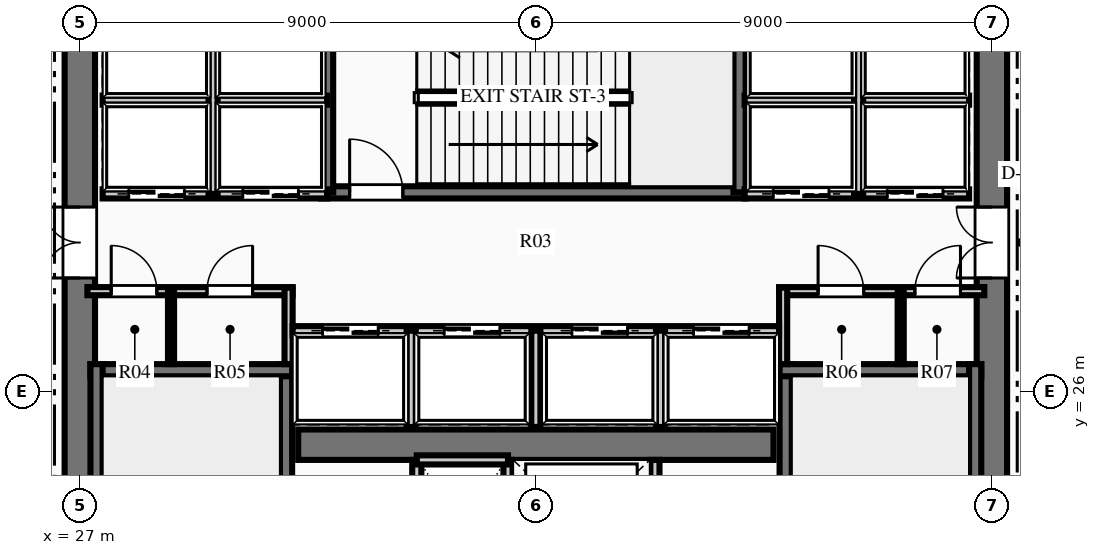
"""IFC4 building model, lengths in metres.
Left out: names, types, materials, properties, quantities, classifications, styles, units other than length and angle.
Written with IfcOpenShell. Run it as: python <this file> out.ifc"""

import sys

from ifc_helpers import new_model, si_unit, direction, frame, frame_2d, origin, place, context, subcontext, project, spatial, rectangle, extrude, element, fill, save


model = new_model("IFC4")
c1 = context("Model", 3, precision=1e-05, world=origin(), true_north=direction((0.0, 1.0)))
c2 = subcontext(c1, "Body", "Model", "MODEL_VIEW")
j1 = project(units=[si_unit("LENGTHUNIT", "METRE"), si_unit("PLANEANGLEUNIT", "RADIAN")], contexts=[c1])
p1 = place(None, origin())
s1 = spatial("IfcSite", under=j1, at=p1, CompositionType="ELEMENT")
p2 = place(p1, origin())
s2 = spatial("IfcBuilding", under=s1, at=p2, CompositionType="ELEMENT")
p3 = place(p2, frame((0.0, 0.0, 6.0)))
s3 = spatial("IfcBuildingStorey", under=s2, at=p3, CompositionType="ELEMENT", Elevation=6.0)
p4 = place(p3, frame((27.0, 18.3, 0.0), z_axis=(0.0, 0.0, 1.0), x_axis=(0.0, 1.0, 0.0)))
e1 = element("IfcWall", 1, at=p4, inside=s3, PredefinedType="SHEAR", context=c2, shape_type="SweptSolid", body=[
    extrude(rectangle(XDim=15.4, YDim=0.6, at=frame_2d((7.7, 0.0))), origin(), (0.0, 0.0, 1.0), 5.4),
])
p5 = place(p4, frame((9.94, 0.0, 0.0)))
e2 = element("IfcOpeningElement", 2, at=p5, cuts=e1, PredefinedType="OPENING", context=c2, shape_type="SweptSolid", body=[
    extrude(rectangle(XDim=1.4, YDim=2.2, at=frame_2d((0.7, 1.1))), frame((0.0, 0.31, 0.0), z_axis=(0.0, -1.0, 0.0), x_axis=(1.0, 0.0, 0.0)), (0.0, 0.0, 1.0), 0.62),
])
p6 = place(p3, frame((45.0, 18.3, 0.0), z_axis=(0.0, 0.0, 1.0), x_axis=(0.0, 1.0, 0.0)))
e3 = element("IfcWall", 3, at=p6, inside=s3, PredefinedType="SHEAR", context=c2, shape_type="SweptSolid", body=[
    extrude(rectangle(XDim=15.4, YDim=0.6, at=frame_2d((7.7, 0.0))), origin(), (0.0, 0.0, 1.0), 5.4),
])
p7 = place(p6, frame((9.94, 0.0, 0.0)))
e4 = element("IfcOpeningElement", 4, at=p7, cuts=e3, PredefinedType="OPENING", context=c2, shape_type="SweptSolid", body=[
    extrude(rectangle(XDim=1.4, YDim=2.2, at=frame_2d((0.7, 1.1))), frame((0.0, 0.31, 0.0), z_axis=(0.0, -1.0, 0.0), x_axis=(1.0, 0.0, 0.0)), (0.0, 0.0, 1.0), 0.62),
])
p8 = place(p3, frame((31.31, 24.95, 0.0), z_axis=(0.0, 0.0, 1.0), x_axis=(1.0, 0.0, 0.0)))
e5 = element("IfcWall", 5, at=p8, inside=s3, PredefinedType="SHEAR", context=c2, shape_type="SweptSolid", body=[
    extrude(rectangle(XDim=9.38, YDim=0.6, at=frame_2d((4.69, 0.0))), origin(), (0.0, 0.0, 1.0), 5.4),
])
p9 = place(p3, frame((31.07, 18.28, 0.0), z_axis=(0.0, 0.0, 1.0), x_axis=(0.0, 1.0, 0.0)))
e6 = element("IfcWall", 6, at=p9, inside=s3, PredefinedType="SHEAR", context=c2, shape_type="SweptSolid", body=[
    extrude(rectangle(XDim=8.26, YDim=0.24, at=frame_2d((4.13, 0.0))), origin(), (0.0, 0.0, 1.0), 5.4),
])
p10 = place(p9, frame((0.365, 0.0, 0.0)))
e7 = element("IfcOpeningElement", 7, at=p10, cuts=e6, PredefinedType="OPENING", context=c2, shape_type="SweptSolid", body=[
    extrude(rectangle(XDim=1.05, YDim=2.15, at=frame_2d((0.525, 1.075))), frame((0.0, 0.13, 0.0), z_axis=(0.0, -1.0, 0.0), x_axis=(1.0, 0.0, 0.0)), (0.0, 0.0, 1.0), 0.26),
])
p11 = place(p3, frame((27.21, 26.42, 0.0), z_axis=(0.0, 0.0, 1.0), x_axis=(1.0, 0.0, 0.0)))
e8 = element("IfcWall", 8, at=p11, inside=s3, PredefinedType="SHEAR", context=c2, shape_type="SweptSolid", body=[
    extrude(rectangle(XDim=3.98, YDim=0.24, at=frame_2d((1.99, 0.0))), origin(), (0.0, 0.0, 1.0), 5.4),
])
p12 = place(p3, frame((27.33, 18.28, 0.0), z_axis=(0.0, 0.0, 1.0), x_axis=(0.0, 1.0, 0.0)))
e9 = element("IfcWall", 9, at=p12, inside=s3, PredefinedType="SHEAR", context=c2, shape_type="SweptSolid", body=[
    extrude(rectangle(XDim=8.26, YDim=0.24, at=frame_2d((4.13, 0.0))), origin(), (0.0, 0.0, 1.0), 5.4),
])
p13 = place(p3, frame((40.93, 18.28, 0.0), z_axis=(0.0, 0.0, 1.0), x_axis=(0.0, 1.0, 0.0)))
e10 = element("IfcWall", 10, at=p13, inside=s3, PredefinedType="SHEAR", context=c2, shape_type="SweptSolid", body=[
    extrude(rectangle(XDim=8.26, YDim=0.24, at=frame_2d((4.13, 0.0))), origin(), (0.0, 0.0, 1.0), 5.4),
])
p14 = place(p13, frame((0.365, 0.0, 0.0)))
e11 = element("IfcOpeningElement", 11, at=p14, cuts=e10, PredefinedType="OPENING", context=c2, shape_type="SweptSolid", body=[
    extrude(rectangle(XDim=1.05, YDim=2.15, at=frame_2d((0.525, 1.075))), frame((0.0, 0.13, 0.0), z_axis=(0.0, -1.0, 0.0), x_axis=(1.0, 0.0, 0.0)), (0.0, 0.0, 1.0), 0.26),
])
p15 = place(p3, frame((40.81, 26.42, 0.0), z_axis=(0.0, 0.0, 1.0), x_axis=(1.0, 0.0, 0.0)))
e12 = element("IfcWall", 12, at=p15, inside=s3, PredefinedType="SHEAR", context=c2, shape_type="SweptSolid", body=[
    extrude(rectangle(XDim=3.98, YDim=0.24, at=frame_2d((1.99, 0.0))), origin(), (0.0, 0.0, 1.0), 5.4),
])
p16 = place(p3, frame((44.67, 18.28, 0.0), z_axis=(0.0, 0.0, 1.0), x_axis=(0.0, 1.0, 0.0)))
e13 = element("IfcWall", 13, at=p16, inside=s3, PredefinedType="SHEAR", context=c2, shape_type="SweptSolid", body=[
    extrude(rectangle(XDim=8.26, YDim=0.24, at=frame_2d((4.13, 0.0))), origin(), (0.0, 0.0, 1.0), 5.4),
])
p17 = place(p3, frame((31.76, 29.93, 0.0), z_axis=(0.0, 0.0, 1.0), x_axis=(1.0, 0.0, 0.0)))
e14 = element("IfcWall", 14, at=p17, inside=s3, PredefinedType="SHEAR", context=c2, shape_type="SweptSolid", body=[
    extrude(rectangle(XDim=8.38, YDim=0.24, at=frame_2d((4.19, 0.0))), origin(), (0.0, 0.0, 1.0), 5.4),
])
p18 = place(p17, frame((0.565, 0.0, 0.0)))
e15 = element("IfcOpeningElement", 15, at=p18, cuts=e14, PredefinedType="OPENING", context=c2, shape_type="SweptSolid", body=[
    extrude(rectangle(XDim=1.05, YDim=2.15, at=frame_2d((0.525, 1.075))), frame((0.0, 0.13, 0.0), z_axis=(0.0, -1.0, 0.0), x_axis=(1.0, 0.0, 0.0)), (0.0, 0.0, 1.0), 0.26),
])
p19 = place(p3, frame((31.88, 29.93, 0.0), z_axis=(0.0, 0.0, 1.0), x_axis=(0.0, 1.0, 0.0)))
e16 = element("IfcWall", 16, at=p19, inside=s3, PredefinedType="SHEAR", context=c2, shape_type="SweptSolid", body=[
    extrude(rectangle(XDim=3.79, YDim=0.24, at=frame_2d((1.895, 0.0))), origin(), (0.0, 0.0, 1.0), 5.4),
])
p20 = place(p3, frame((40.02, 29.93, 0.0), z_axis=(0.0, 0.0, 1.0), x_axis=(0.0, 1.0, 0.0)))
e17 = element("IfcWall", 17, at=p20, inside=s3, PredefinedType="SHEAR", context=c2, shape_type="SweptSolid", body=[
    extrude(rectangle(XDim=3.85, YDim=0.24, at=frame_2d((1.925, 0.0))), origin(), (0.0, 0.0, 1.0), 5.4),
])
for number, where, z_axis, x_axis in (
    (18, (33.65, 22.05, 0.0), (0.0, 0.0, 1.0), (0.0, 1.0, 0.0)),
    (19, (35.45, 22.05, 0.0), (0.0, 0.0, 1.0), (0.0, 1.0, 0.0)),
):
    element("IfcWall", number, at=place(p3, frame(where, z_axis=z_axis, x_axis=x_axis)), inside=s3, PredefinedType="PARTITIONING", context=c2, shape_type="SweptSolid", body=[
        extrude(rectangle(XDim=2.6, YDim=0.18, at=frame_2d((1.3, 0.0))), origin(), (0.0, 0.0, 1.0), 5.07),
    ])
p21 = place(p3, frame((33.65, 24.65, 0.0), z_axis=(0.0, 0.0, 1.0), x_axis=(1.0, 0.0, 0.0)))
e20 = element("IfcWall", 20, at=p21, inside=s3, PredefinedType="PARTITIONING", context=c2, shape_type="SweptSolid", body=[
    extrude(rectangle(XDim=1.8, YDim=0.18, at=frame_2d((0.9, 0.0))), origin(), (0.0, 0.0, 1.0), 5.07),
])
p22 = place(p3, frame((38.35, 22.05, 0.0), z_axis=(0.0, 0.0, 1.0), x_axis=(0.0, 1.0, 0.0)))
e21 = element("IfcWall", 21, at=p22, inside=s3, PredefinedType="PARTITIONING", context=c2, shape_type="SweptSolid", body=[
    extrude(rectangle(XDim=2.6, YDim=0.18, at=frame_2d((1.3, 0.0))), origin(), (0.0, 0.0, 1.0), 5.07),
])
p23 = place(p3, frame((27.15, 27.98, 0.0), z_axis=(0.0, 0.0, 1.0), x_axis=(1.0, 0.0, 0.0)))
e22 = element("IfcWall", 22, at=p23, inside=s3, PredefinedType="PARTITIONING", context=c2, shape_type="SweptSolid", body=[
    extrude(rectangle(XDim=4.05, YDim=0.16, at=frame_2d((2.025, 0.0))), origin(), (0.0, 0.0, 1.0), 5.07),
])
p24 = place(p23, frame((0.47, 0.0, 0.0)))
e23 = element("IfcOpeningElement", 23, at=p24, cuts=e22, PredefinedType="OPENING", context=c2, shape_type="SweptSolid", body=[
    extrude(rectangle(XDim=0.9, YDim=2.15, at=frame_2d((0.45, 1.075))), frame((0.0, 0.09, 0.0), z_axis=(0.0, -1.0, 0.0), x_axis=(1.0, 0.0, 0.0)), (0.0, 0.0, 1.0), 0.18),
])
p25 = place(p23, frame((2.36, 0.0, 0.0)))
e24 = element("IfcOpeningElement", 24, at=p25, cuts=e22, PredefinedType="OPENING", context=c2, shape_type="SweptSolid", body=[
    extrude(rectangle(XDim=0.9, YDim=2.15, at=frame_2d((0.45, 1.075))), frame((0.0, 0.09, 0.0), z_axis=(0.0, -1.0, 0.0), x_axis=(1.0, 0.0, 0.0)), (0.0, 0.0, 1.0), 0.18),
])
p26 = place(p3, frame((31.12, 26.54, 0.0), z_axis=(0.0, 0.0, 1.0), x_axis=(0.0, 1.0, 0.0)))
e25 = element("IfcWall", 25, at=p26, inside=s3, PredefinedType="PARTITIONING", context=c2, shape_type="SweptSolid", body=[
    extrude(rectangle(XDim=1.51, YDim=0.16, at=frame_2d((0.755, 0.0))), origin(), (0.0, 0.0, 1.0), 5.07),
])
p27 = place(p3, frame((40.8, 27.98, 0.0), z_axis=(0.0, 0.0, 1.0), x_axis=(1.0, 0.0, 0.0)))
e26 = element("IfcWall", 26, at=p27, inside=s3, PredefinedType="PARTITIONING", context=c2, shape_type="SweptSolid", body=[
    extrude(rectangle(XDim=4.05, YDim=0.16, at=frame_2d((2.025, 0.0))), origin(), (0.0, 0.0, 1.0), 5.07),
])
p28 = place(p27, frame((0.77, 0.0, 0.0)))
e27 = element("IfcOpeningElement", 27, at=p28, cuts=e26, PredefinedType="OPENING", context=c2, shape_type="SweptSolid", body=[
    extrude(rectangle(XDim=0.9, YDim=2.15, at=frame_2d((0.45, 1.075))), frame((0.0, 0.09, 0.0), z_axis=(0.0, -1.0, 0.0), x_axis=(1.0, 0.0, 0.0)), (0.0, 0.0, 1.0), 0.18),
])
p29 = place(p27, frame((2.68, 0.0, 0.0)))
e28 = element("IfcOpeningElement", 28, at=p29, cuts=e26, PredefinedType="OPENING", context=c2, shape_type="SweptSolid", body=[
    extrude(rectangle(XDim=0.9, YDim=2.15, at=frame_2d((0.45, 1.075))), frame((0.0, 0.09, 0.0), z_axis=(0.0, -1.0, 0.0), x_axis=(1.0, 0.0, 0.0)), (0.0, 0.0, 1.0), 0.18),
])
p30 = place(p3, frame((40.88, 26.54, 0.0), z_axis=(0.0, 0.0, 1.0), x_axis=(0.0, 1.0, 0.0)))
e29 = element("IfcWall", 29, at=p30, inside=s3, PredefinedType="PARTITIONING", context=c2, shape_type="SweptSolid", body=[
    extrude(rectangle(XDim=1.51, YDim=0.16, at=frame_2d((0.755, 0.0))), origin(), (0.0, 0.0, 1.0), 5.07),
])
for number, where, z_axis, x_axis in (
    (30, (28.8, 26.54, 0.0), (0.0, 0.0, 1.0), (0.0, 1.0, 0.0)),
    (31, (43.2, 26.54, 0.0), (0.0, 0.0, 1.0), (0.0, 1.0, 0.0)),
):
    element("IfcWall", number, at=place(p3, frame(where, z_axis=z_axis, x_axis=x_axis)), inside=s3, PredefinedType="PARTITIONING", context=c2, shape_type="SweptSolid", body=[
        extrude(rectangle(XDim=1.44, YDim=0.12, at=frame_2d((0.72, 0.0))), origin(), (0.0, 0.0, 1.0), 5.07),
    ])
p31 = place(p3, frame((27.45, 29.9, 0.0), z_axis=(0.0, 0.0, 1.0), x_axis=(1.0, 0.0, 0.0)))
e32 = element("IfcWall", 32, at=p31, inside=s3, PredefinedType="PARTITIONING", context=c2, shape_type="SweptSolid", body=[
    extrude(rectangle(XDim=4.43, YDim=0.18, at=frame_2d((2.215, 0.0))), origin(), (0.0, 0.0, 1.0), 5.07),
])
p32 = place(p31, frame((0.515, 0.0, 0.0)))
e33 = element("IfcOpeningElement", 33, at=p32, cuts=e32, PredefinedType="OPENING", context=c2, shape_type="SweptSolid", body=[
    extrude(rectangle(XDim=1.1, YDim=2.15, at=frame_2d((0.55, 1.075))), frame((0.0, 0.1, 0.0), z_axis=(0.0, -1.0, 0.0), x_axis=(1.0, 0.0, 0.0)), (0.0, 0.0, 1.0), 0.2),
])
p33 = place(p31, frame((2.765, 0.0, 0.0)))
e34 = element("IfcOpeningElement", 34, at=p33, cuts=e32, PredefinedType="OPENING", context=c2, shape_type="SweptSolid", body=[
    extrude(rectangle(XDim=1.1, YDim=2.15, at=frame_2d((0.55, 1.075))), frame((0.0, 0.1, 0.0), z_axis=(0.0, -1.0, 0.0), x_axis=(1.0, 0.0, 0.0)), (0.0, 0.0, 1.0), 0.2),
])
p34 = place(p3, frame((27.45, 31.75, 0.0), z_axis=(0.0, 0.0, 1.0), x_axis=(1.0, 0.0, 0.0)))
e35 = element("IfcWall", 35, at=p34, inside=s3, PredefinedType="PARTITIONING", context=c2, shape_type="SweptSolid", body=[
    extrude(rectangle(XDim=4.43, YDim=0.18, at=frame_2d((2.215, 0.0))), origin(), (0.0, 0.0, 1.0), 5.07),
])
p35 = place(p3, frame((29.63, 29.9, 0.0), z_axis=(0.0, 0.0, 1.0), x_axis=(0.0, 1.0, 0.0)))
e36 = element("IfcWall", 36, at=p35, inside=s3, PredefinedType="PARTITIONING", context=c2, shape_type="SweptSolid", body=[
    extrude(rectangle(XDim=3.75, YDim=0.18, at=frame_2d((1.875, 0.0))), origin(), (0.0, 0.0, 1.0), 5.07),
])
p36 = place(p3, frame((40.12, 29.9, 0.0), z_axis=(0.0, 0.0, 1.0), x_axis=(1.0, 0.0, 0.0)))
e37 = element("IfcWall", 37, at=p36, inside=s3, PredefinedType="PARTITIONING", context=c2, shape_type="SweptSolid", body=[
    extrude(rectangle(XDim=4.43, YDim=0.18, at=frame_2d((2.215, 0.0))), origin(), (0.0, 0.0, 1.0), 5.07),
])
p37 = place(p36, frame((0.565, 0.0, 0.0)))
e38 = element("IfcOpeningElement", 38, at=p37, cuts=e37, PredefinedType="OPENING", context=c2, shape_type="SweptSolid", body=[
    extrude(rectangle(XDim=1.1, YDim=2.15, at=frame_2d((0.55, 1.075))), frame((0.0, 0.1, 0.0), z_axis=(0.0, -1.0, 0.0), x_axis=(1.0, 0.0, 0.0)), (0.0, 0.0, 1.0), 0.2),
])
p38 = place(p36, frame((2.815, 0.0, 0.0)))
e39 = element("IfcOpeningElement", 39, at=p38, cuts=e37, PredefinedType="OPENING", context=c2, shape_type="SweptSolid", body=[
    extrude(rectangle(XDim=1.1, YDim=2.15, at=frame_2d((0.55, 1.075))), frame((0.0, 0.1, 0.0), z_axis=(0.0, -1.0, 0.0), x_axis=(1.0, 0.0, 0.0)), (0.0, 0.0, 1.0), 0.2),
])
p39 = place(p3, frame((40.12, 31.75, 0.0), z_axis=(0.0, 0.0, 1.0), x_axis=(1.0, 0.0, 0.0)))
e40 = element("IfcWall", 40, at=p39, inside=s3, PredefinedType="PARTITIONING", context=c2, shape_type="SweptSolid", body=[
    extrude(rectangle(XDim=4.43, YDim=0.18, at=frame_2d((2.215, 0.0))), origin(), (0.0, 0.0, 1.0), 5.07),
])
p40 = place(p3, frame((42.37, 29.9, 0.0), z_axis=(0.0, 0.0, 1.0), x_axis=(0.0, 1.0, 0.0)))
e41 = element("IfcWall", 41, at=p40, inside=s3, PredefinedType="PARTITIONING", context=c2, shape_type="SweptSolid", body=[
    extrude(rectangle(XDim=3.75, YDim=0.18, at=frame_2d((1.875, 0.0))), origin(), (0.0, 0.0, 1.0), 5.07),
])
p41 = place(p3, frame((31.2, 27.2, 0.0), z_axis=(0.0, 0.0, 1.0), x_axis=(1.0, 0.0, 0.0)))
e42 = element("IfcWall", 42, at=p41, inside=s3, PredefinedType="PARTITIONING", context=c2, shape_type="SweptSolid", body=[
    extrude(rectangle(XDim=9.6, YDim=0.18, at=frame_2d((4.8, 0.0))), origin(), (0.0, 0.0, 1.0), 5.07),
])
p42 = place(p41, frame((0.59, 0.0, 0.0)))
e43 = element("IfcOpeningElement", 43, at=p42, cuts=e42, PredefinedType="OPENING", context=c2, shape_type="SweptSolid", body=[
    extrude(rectangle(XDim=1.1, YDim=2.15, at=frame_2d((0.55, 1.075))), frame((0.0, 0.1, 0.0), z_axis=(0.0, -1.0, 0.0), x_axis=(1.0, 0.0, 0.0)), (0.0, 0.0, 1.0), 0.2),
])
p43 = place(p41, frame((2.99, 0.0, 0.0)))
e44 = element("IfcOpeningElement", 44, at=p43, cuts=e42, PredefinedType="OPENING", context=c2, shape_type="SweptSolid", body=[
    extrude(rectangle(XDim=1.1, YDim=2.15, at=frame_2d((0.55, 1.075))), frame((0.0, 0.1, 0.0), z_axis=(0.0, -1.0, 0.0), x_axis=(1.0, 0.0, 0.0)), (0.0, 0.0, 1.0), 0.2),
])
p44 = place(p41, frame((5.51, 0.0, 0.0)))
e45 = element("IfcOpeningElement", 45, at=p44, cuts=e42, PredefinedType="OPENING", context=c2, shape_type="SweptSolid", body=[
    extrude(rectangle(XDim=1.1, YDim=2.15, at=frame_2d((0.55, 1.075))), frame((0.0, 0.1, 0.0), z_axis=(0.0, -1.0, 0.0), x_axis=(1.0, 0.0, 0.0)), (0.0, 0.0, 1.0), 0.2),
])
p45 = place(p41, frame((7.91, 0.0, 0.0)))
e46 = element("IfcOpeningElement", 46, at=p45, cuts=e42, PredefinedType="OPENING", context=c2, shape_type="SweptSolid", body=[
    extrude(rectangle(XDim=1.1, YDim=2.15, at=frame_2d((0.55, 1.075))), frame((0.0, 0.1, 0.0), z_axis=(0.0, -1.0, 0.0), x_axis=(1.0, 0.0, 0.0)), (0.0, 0.0, 1.0), 0.2),
])
for number, where, z_axis, x_axis in (
    (47, (33.54, 25.3, 0.0), (0.0, 0.0, 1.0), (0.0, 1.0, 0.0)),
    (48, (36.0, 25.3, 0.0), (0.0, 0.0, 1.0), (0.0, 1.0, 0.0)),
    (49, (38.46, 25.3, 0.0), (0.0, 0.0, 1.0), (0.0, 1.0, 0.0)),
):
    element("IfcWall", number, at=place(p3, frame(where, z_axis=z_axis, x_axis=x_axis)), inside=s3, PredefinedType="PARTITIONING", context=c2, shape_type="SweptSolid", body=[
        extrude(rectangle(XDim=1.9, YDim=0.18, at=frame_2d((0.95, 0.0))), origin(), (0.0, 0.0, 1.0), 5.07),
    ])
p46 = place(p24, origin())
e50 = element("IfcDoor", 50, at=p46, inside=s3, OperationType="SINGLE_SWING_LEFT", PredefinedType="DOOR", context=c2, shape_type="SweptSolid", body=[
    extrude(rectangle(XDim=0.9, YDim=2.15, at=frame_2d((0.45, 1.075))), frame((0.0, 0.025, 0.0), z_axis=(0.0, -1.0, 0.0), x_axis=(1.0, 0.0, 0.0)), (0.0, 0.0, 1.0), 0.05),
])
fill(e23, e50)
p47 = place(p25, origin())
e51 = element("IfcDoor", 51, at=p47, inside=s3, OperationType="SINGLE_SWING_RIGHT", PredefinedType="DOOR", context=c2, shape_type="SweptSolid", body=[
    extrude(rectangle(XDim=0.9, YDim=2.15, at=frame_2d((0.45, 1.075))), frame((0.0, 0.025, 0.0), z_axis=(0.0, -1.0, 0.0), x_axis=(1.0, 0.0, 0.0)), (0.0, 0.0, 1.0), 0.05),
])
fill(e24, e51)
p48 = place(p28, origin())
e52 = element("IfcDoor", 52, at=p48, inside=s3, OperationType="SINGLE_SWING_LEFT", PredefinedType="DOOR", context=c2, shape_type="SweptSolid", body=[
    extrude(rectangle(XDim=0.9, YDim=2.15, at=frame_2d((0.45, 1.075))), frame((0.0, 0.025, 0.0), z_axis=(0.0, -1.0, 0.0), x_axis=(1.0, 0.0, 0.0)), (0.0, 0.0, 1.0), 0.05),
])
fill(e27, e52)
p49 = place(p29, origin())
e53 = element("IfcDoor", 53, at=p49, inside=s3, OperationType="SINGLE_SWING_RIGHT", PredefinedType="DOOR", context=c2, shape_type="SweptSolid", body=[
    extrude(rectangle(XDim=0.9, YDim=2.15, at=frame_2d((0.45, 1.075))), frame((0.0, 0.025, 0.0), z_axis=(0.0, -1.0, 0.0), x_axis=(1.0, 0.0, 0.0)), (0.0, 0.0, 1.0), 0.05),
])
fill(e28, e53)
p50 = place(p18, origin())
e54 = element("IfcDoor", 54, at=p50, inside=s3, OperationType="SINGLE_SWING_LEFT", PredefinedType="DOOR", context=c2, shape_type="SweptSolid", body=[
    extrude(rectangle(XDim=1.05, YDim=2.15, at=frame_2d((0.525, 1.075))), frame((0.0, 0.025, 0.0), z_axis=(0.0, -1.0, 0.0), x_axis=(1.0, 0.0, 0.0)), (0.0, 0.0, 1.0), 0.05),
])
fill(e15, e54)
p51 = place(p5, origin())
e55 = element("IfcDoor", 55, at=p51, inside=s3, OperationType="DOUBLE_DOOR_SINGLE_SWING", PredefinedType="DOOR", context=c2, shape_type="SweptSolid", body=[
    extrude(rectangle(XDim=1.4, YDim=2.2, at=frame_2d((0.7, 1.1))), frame((0.0, 0.025, 0.0), z_axis=(0.0, -1.0, 0.0), x_axis=(1.0, 0.0, 0.0)), (0.0, 0.0, 1.0), 0.05),
])
fill(e2, e55)
p52 = place(p7, origin())
e56 = element("IfcDoor", 56, at=p52, inside=s3, OperationType="DOUBLE_DOOR_SINGLE_SWING", PredefinedType="DOOR", context=c2, shape_type="SweptSolid", body=[
    extrude(rectangle(XDim=1.4, YDim=2.2, at=frame_2d((0.7, 1.1))), frame((0.0, 0.025, 0.0), z_axis=(0.0, -1.0, 0.0), x_axis=(1.0, 0.0, 0.0)), (0.0, 0.0, 1.0), 0.05),
])
fill(e4, e56)
p53 = place(p32, origin())
e57 = element("IfcDoor", 57, at=p53, inside=s3, OperationType="SLIDING_TO_LEFT", PredefinedType="DOOR", context=c2, shape_type="SweptSolid", body=[
    extrude(rectangle(XDim=1.1, YDim=2.15, at=frame_2d((0.55, 1.075))), frame((0.0, 0.025, 0.0), z_axis=(0.0, -1.0, 0.0), x_axis=(1.0, 0.0, 0.0)), (0.0, 0.0, 1.0), 0.05),
])
fill(e33, e57)
p54 = place(p33, origin())
e58 = element("IfcDoor", 58, at=p54, inside=s3, OperationType="SLIDING_TO_LEFT", PredefinedType="DOOR", context=c2, shape_type="SweptSolid", body=[
    extrude(rectangle(XDim=1.1, YDim=2.15, at=frame_2d((0.55, 1.075))), frame((0.0, 0.025, 0.0), z_axis=(0.0, -1.0, 0.0), x_axis=(1.0, 0.0, 0.0)), (0.0, 0.0, 1.0), 0.05),
])
fill(e34, e58)
p55 = place(p37, origin())
e59 = element("IfcDoor", 59, at=p55, inside=s3, OperationType="SLIDING_TO_LEFT", PredefinedType="DOOR", context=c2, shape_type="SweptSolid", body=[
    extrude(rectangle(XDim=1.1, YDim=2.15, at=frame_2d((0.55, 1.075))), frame((0.0, 0.025, 0.0), z_axis=(0.0, -1.0, 0.0), x_axis=(1.0, 0.0, 0.0)), (0.0, 0.0, 1.0), 0.05),
])
fill(e38, e59)
p56 = place(p38, origin())
e60 = element("IfcDoor", 60, at=p56, inside=s3, OperationType="SLIDING_TO_LEFT", PredefinedType="DOOR", context=c2, shape_type="SweptSolid", body=[
    extrude(rectangle(XDim=1.1, YDim=2.15, at=frame_2d((0.55, 1.075))), frame((0.0, 0.025, 0.0), z_axis=(0.0, -1.0, 0.0), x_axis=(1.0, 0.0, 0.0)), (0.0, 0.0, 1.0), 0.05),
])
fill(e39, e60)
p57 = place(p42, origin())
e61 = element("IfcDoor", 61, at=p57, inside=s3, OperationType="SLIDING_TO_LEFT", PredefinedType="DOOR", context=c2, shape_type="SweptSolid", body=[
    extrude(rectangle(XDim=1.1, YDim=2.15, at=frame_2d((0.55, 1.075))), frame((0.0, 0.025, 0.0), z_axis=(0.0, -1.0, 0.0), x_axis=(1.0, 0.0, 0.0)), (0.0, 0.0, 1.0), 0.05),
])
fill(e43, e61)
p58 = place(p43, origin())
e62 = element("IfcDoor", 62, at=p58, inside=s3, OperationType="SLIDING_TO_LEFT", PredefinedType="DOOR", context=c2, shape_type="SweptSolid", body=[
    extrude(rectangle(XDim=1.1, YDim=2.15, at=frame_2d((0.55, 1.075))), frame((0.0, 0.025, 0.0), z_axis=(0.0, -1.0, 0.0), x_axis=(1.0, 0.0, 0.0)), (0.0, 0.0, 1.0), 0.05),
])
fill(e44, e62)
p59 = place(p44, origin())
e63 = element("IfcDoor", 63, at=p59, inside=s3, OperationType="SLIDING_TO_LEFT", PredefinedType="DOOR", context=c2, shape_type="SweptSolid", body=[
    extrude(rectangle(XDim=1.1, YDim=2.15, at=frame_2d((0.55, 1.075))), frame((0.0, 0.025, 0.0), z_axis=(0.0, -1.0, 0.0), x_axis=(1.0, 0.0, 0.0)), (0.0, 0.0, 1.0), 0.05),
])
fill(e45, e63)
p60 = place(p45, origin())
e64 = element("IfcDoor", 64, at=p60, inside=s3, OperationType="SLIDING_TO_LEFT", PredefinedType="DOOR", context=c2, shape_type="SweptSolid", body=[
    extrude(rectangle(XDim=1.1, YDim=2.15, at=frame_2d((0.55, 1.075))), frame((0.0, 0.025, 0.0), z_axis=(0.0, -1.0, 0.0), x_axis=(1.0, 0.0, 0.0)), (0.0, 0.0, 1.0), 0.05),
])
fill(e46, e64)
save(model, sys.argv[1])
